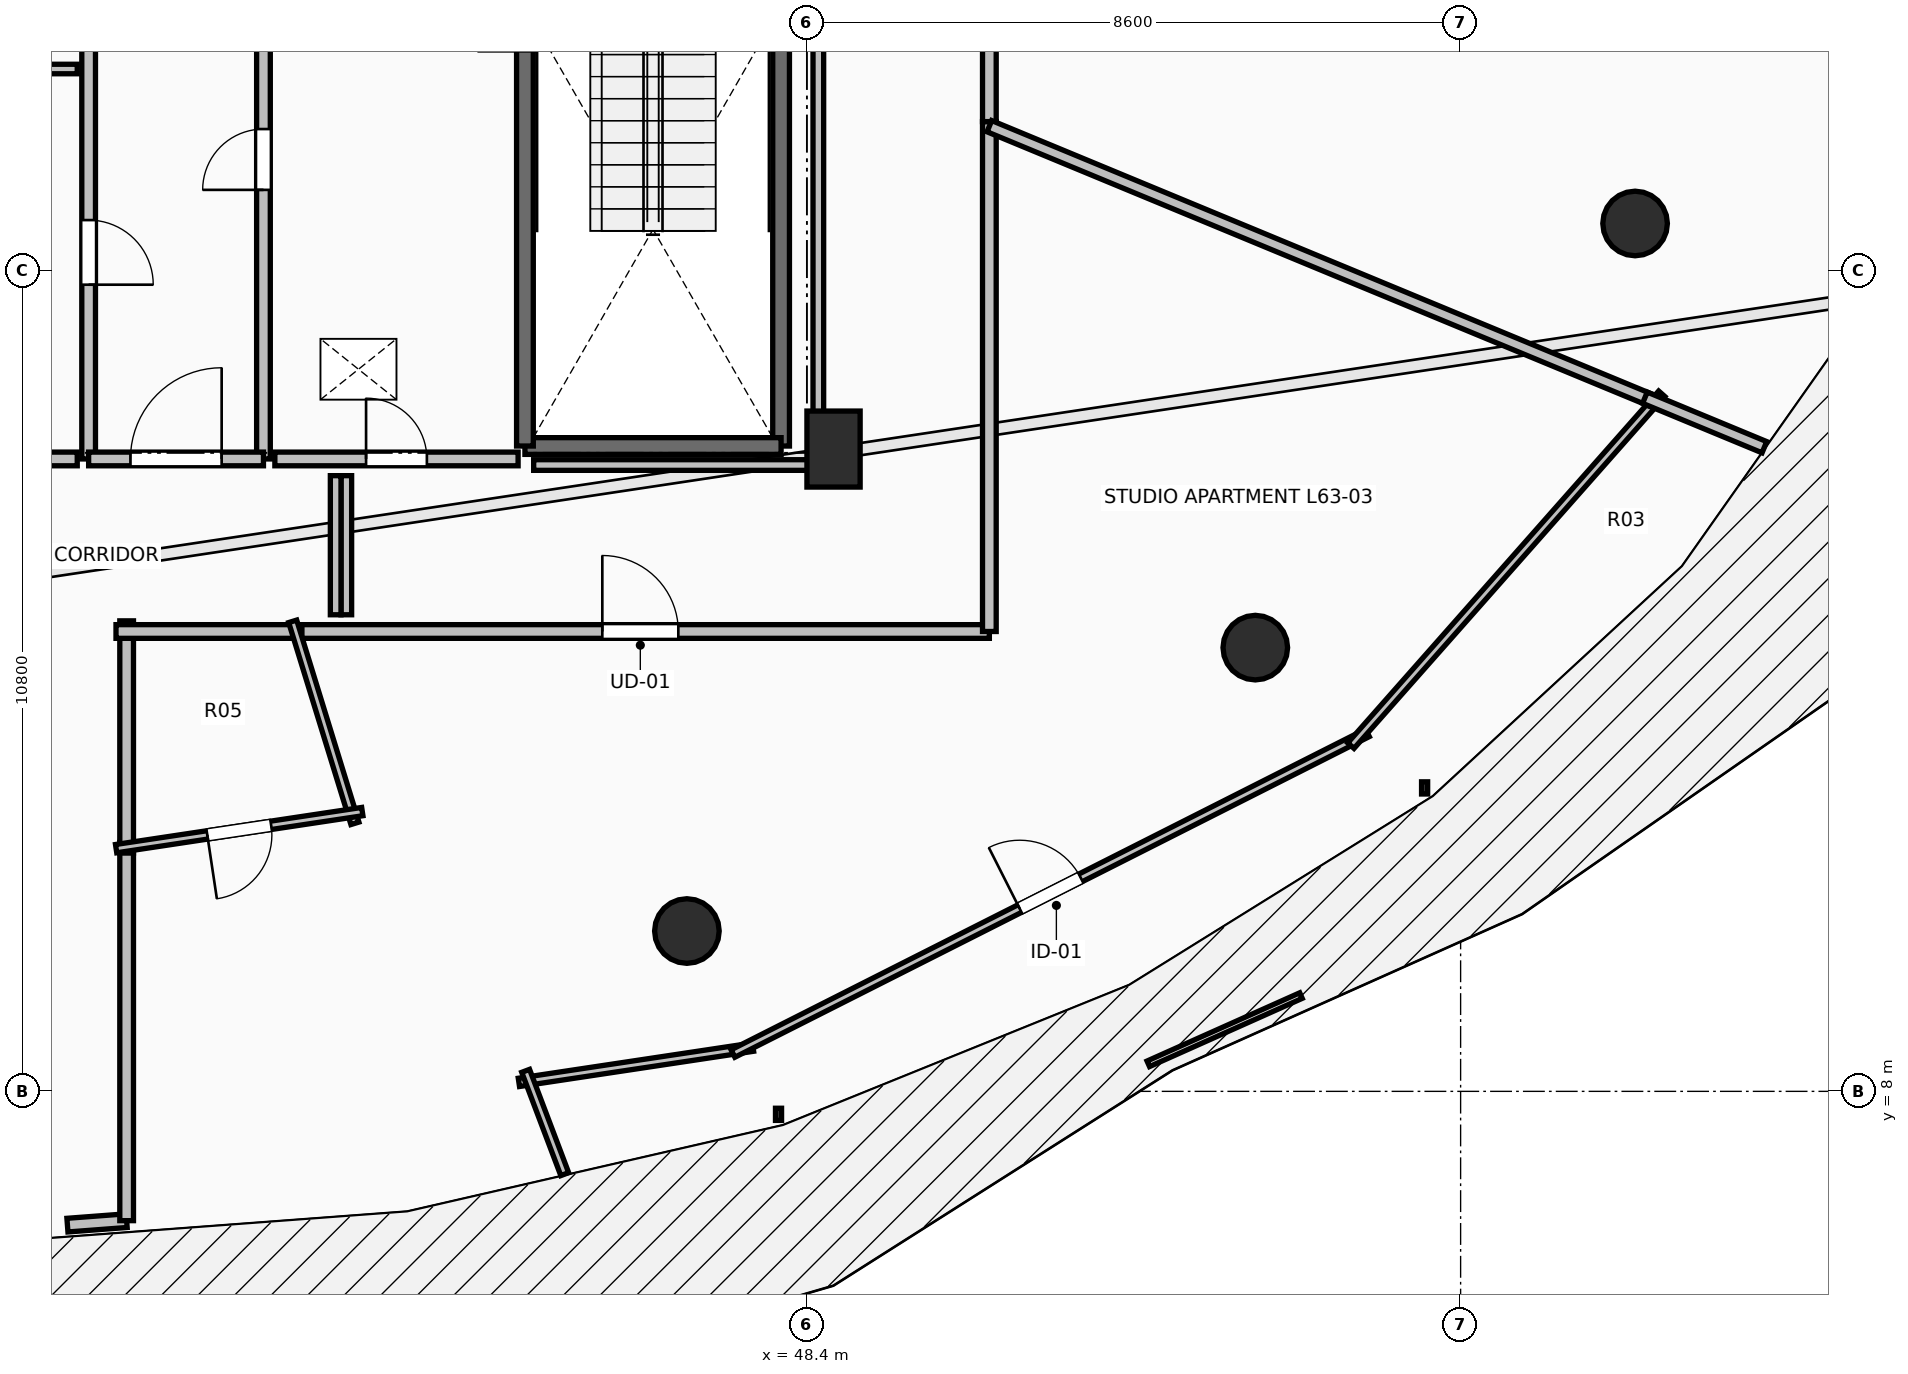
"""IFC4 building model, lengths in metres.
Left out: names, types, materials, properties, quantities, classifications, styles, units other than length and angle.
Written with IfcOpenShell. Run it as: python <this file> out.ifc"""

import sys

from ifc_helpers import new_model, si_unit, direction, frame, frame_2d, origin, origin_2d, place, context, subcontext, project, spatial, rectangle, circle, extrude, element, fill, save


model = new_model("IFC4")
c1 = context("Model", 3, precision=1e-05, world=origin(), true_north=direction((0.0, 1.0)))
c2 = subcontext(c1, "Body", "Model", "MODEL_VIEW")
j1 = project(units=[si_unit("LENGTHUNIT", "METRE"), si_unit("PLANEANGLEUNIT", "RADIAN")], contexts=[c1])
p1 = place(None, origin())
s1 = spatial("IfcSite", under=j1, at=p1, CompositionType="ELEMENT")
p2 = place(p1, origin())
s2 = spatial("IfcBuilding", under=s1, at=p2, CompositionType="ELEMENT")
p3 = place(p2, frame((0.0, 0.0, 234.25)))
s3 = spatial("IfcBuildingStorey", under=s2, at=p3, CompositionType="ELEMENT", Elevation=234.25)
for number, where, z_axis, x_axis in (
    (1, (46.821, 10.109, 0.0), (0.0, 0.0, 1.0), (0.383, -0.924, 0.0)),
    (2, (54.299, 13.838, 0.0), (0.0, 0.0, 1.0), (0.707, -0.707, 0.0)),
    (3, (59.295, 19.418, 0.0), (0.0, 0.0, 1.0), (0.924, -0.383, 0.0)),
):
    element("IfcColumn", number, at=place(p3, frame(where, z_axis=z_axis, x_axis=x_axis)), inside=s3, PredefinedType="COLUMN", context=c2, shape_type="SweptSolid", body=[
        extrude(circle(Radius=0.425, at=origin_2d()), origin(), (0.0, 0.0, 1.0), 3.55),
    ])
p4 = place(p3, frame((48.75, 16.45, 0.0), z_axis=(0.0, 0.0, 1.0), x_axis=(1.0, 0.0, 0.0)))
e4 = element("IfcColumn", 4, at=p4, inside=s3, PredefinedType="PILASTER", context=c2, shape_type="SweptSolid", body=[
    extrude(rectangle(XDim=0.7, YDim=1.0, at=origin_2d()), origin(), (0.0, 0.0, 1.0), 3.55),
])
p5 = place(p3, frame((48.06, 23.91, 0.0), z_axis=(0.0, 0.0, 1.0), x_axis=(0.0, -1.0, 0.0)))
e5 = element("IfcWall", 5, at=p5, inside=s3, PredefinedType="SOLIDWALL", context=c2, shape_type="SweptSolid", body=[
    extrude(rectangle(XDim=7.42, YDim=0.22, at=frame_2d((3.71, 0.0))), origin(), (0.0, 0.0, 1.0), 3.29),
])
p6 = place(p3, frame((48.06, 16.49, 0.0), z_axis=(0.0, 0.0, 1.0), x_axis=(-1.0, 0.0, 0.0)))
e6 = element("IfcWall", 6, at=p6, inside=s3, PredefinedType="SOLIDWALL", context=c2, shape_type="SweptSolid", body=[
    extrude(rectangle(XDim=3.37, YDim=0.22, at=frame_2d((1.685, 0.0))), origin(), (0.0, 0.0, 1.0), 3.29),
])
p7 = place(p3, frame((44.69, 16.49, 0.0), z_axis=(0.0, 0.0, 1.0), x_axis=(0.0, 1.0, 0.0)))
e7 = element("IfcWall", 7, at=p7, inside=s3, PredefinedType="SOLIDWALL", context=c2, shape_type="SweptSolid", body=[
    extrude(rectangle(XDim=7.42, YDim=0.22, at=frame_2d((3.71, 0.0))), origin(), (0.0, 0.0, 1.0), 3.29),
])
p8 = place(p3, frame((41.25, 16.32, 0.0), z_axis=(0.0, 0.0, 1.0), x_axis=(0.0, 1.0, 0.0)))
e8 = element("IfcWall", 8, at=p8, inside=s3, PredefinedType="PARTITIONING", context=c2, shape_type="SweptSolid", body=[
    extrude(rectangle(XDim=7.88, YDim=0.18, at=frame_2d((3.94, 0.0))), origin(), (0.0, 0.0, 1.0), 2.482),
])
p9 = place(p8, frame((3.54, 0.0, 0.0)))
e9 = element("IfcOpeningElement", 9, at=p9, cuts=e8, PredefinedType="OPENING", context=c2, shape_type="SweptSolid", body=[
    extrude(rectangle(XDim=0.8, YDim=2.05, at=frame_2d((0.4, 1.025))), frame((0.0, 0.105, 0.0), z_axis=(0.0, -1.0, 0.0), x_axis=(1.0, 0.0, 0.0)), (0.0, 0.0, 1.0), 0.21),
])
p10 = place(p3, frame((38.95, 21.755, 0.0), z_axis=(0.0, 0.0, 1.0), x_axis=(0.0, -1.0, 0.0)))
e10 = element("IfcWall", 10, at=p10, inside=s3, PredefinedType="PARTITIONING", context=c2, shape_type="SweptSolid", body=[
    extrude(rectangle(XDim=5.435, YDim=0.18, at=frame_2d((2.717, 0.0))), origin(), (0.0, 0.0, 1.0), 3.29),
])
p11 = place(p10, frame((2.292, 0.0, 0.0)))
e11 = element("IfcOpeningElement", 11, at=p11, cuts=e10, PredefinedType="OPENING", context=c2, shape_type="SweptSolid", body=[
    extrude(rectangle(XDim=0.85, YDim=2.1, at=frame_2d((0.425, 1.05))), frame((0.0, 0.105, 0.0), z_axis=(0.0, -1.0, 0.0), x_axis=(1.0, 0.0, 0.0)), (0.0, 0.0, 1.0), 0.21),
])
p12 = place(p3, frame((38.95, 16.32, 0.0), z_axis=(0.0, 0.0, 1.0), x_axis=(1.0, 0.0, 0.0)))
e12 = element("IfcWall", 12, at=p12, inside=s3, PredefinedType="PARTITIONING", context=c2, shape_type="SweptSolid", body=[
    extrude(rectangle(XDim=2.3, YDim=0.18, at=frame_2d((1.15, 0.0))), origin(), (0.0, 0.0, 1.0), 3.29),
])
p13 = place(p12, frame((0.55, 0.0, 0.0)))
e13 = element("IfcOpeningElement", 13, at=p13, cuts=e12, PredefinedType="OPENING", context=c2, shape_type="SweptSolid", body=[
    extrude(rectangle(XDim=1.2, YDim=2.15, at=frame_2d((0.6, 1.075))), frame((0.0, 0.105, 0.0), z_axis=(0.0, -1.0, 0.0), x_axis=(1.0, 0.0, 0.0)), (0.0, 0.0, 1.0), 0.21),
])
p14 = place(p3, frame((41.4, 16.32, 0.0), z_axis=(0.0, 0.0, 1.0), x_axis=(1.0, 0.0, 0.0)))
e14 = element("IfcWall", 14, at=p14, inside=s3, PredefinedType="PARTITIONING", context=c2, shape_type="SweptSolid", body=[
    extrude(rectangle(XDim=3.2, YDim=0.18, at=frame_2d((1.6, 0.0))), origin(), (0.0, 0.0, 1.0), 3.29),
])
p15 = place(p14, frame((1.2, 0.0, 0.0)))
e15 = element("IfcOpeningElement", 15, at=p15, cuts=e14, PredefinedType="OPENING", context=c2, shape_type="SweptSolid", body=[
    extrude(rectangle(XDim=0.8, YDim=2.05, at=frame_2d((0.4, 1.025))), frame((0.0, 0.105, 0.0), z_axis=(0.0, -1.0, 0.0), x_axis=(1.0, 0.0, 0.0)), (0.0, 0.0, 1.0), 0.21),
])
p16 = place(p3, frame((38.8, 21.45, 0.0), z_axis=(0.0, 0.0, 1.0), x_axis=(-1.0, 0.0, 0.0)))
e16 = element("IfcWall", 16, at=p16, inside=s3, PredefinedType="PARTITIONING", context=c2, shape_type="SweptSolid", body=[
    extrude(rectangle(XDim=3.6, YDim=0.125, at=frame_2d((1.8, 0.0))), origin(), (0.0, 0.0, 1.0), 3.29),
])
p17 = place(p3, frame((35.2, 16.32, 0.0), z_axis=(0.0, 0.0, 1.0), x_axis=(1.0, 0.0, 0.0)))
e17 = element("IfcWall", 17, at=p17, inside=s3, PredefinedType="PARTITIONING", context=c2, shape_type="SweptSolid", body=[
    extrude(rectangle(XDim=3.6, YDim=0.18, at=frame_2d((1.8, 0.0))), origin(), (0.0, 0.0, 1.0), 3.29),
])
p18 = place(p17, frame((1.375, 0.0, 0.0)))
e18 = element("IfcOpeningElement", 18, at=p18, cuts=e17, PredefinedType="OPENING", context=c2, shape_type="SweptSolid", body=[
    extrude(rectangle(XDim=0.85, YDim=2.1, at=frame_2d((0.425, 1.05))), frame((0.0, 0.105, 0.0), z_axis=(0.0, -1.0, 0.0), x_axis=(1.0, 0.0, 0.0)), (0.0, 0.0, 1.0), 0.21),
])
p19 = place(p3, frame((38.671, 6.24, 0.0), z_axis=(0.0, 0.0, 1.0), x_axis=(0.997136622012, 0.0756211415, 0.0)))
e19 = element("IfcWall", 19, at=p19, inside=s3, PredefinedType="PARTITIONING", context=c2, shape_type="SweptSolid", body=[
    extrude(rectangle(XDim=0.781, YDim=0.18, at=frame_2d((0.391, 0.0))), origin(), (0.0, 0.0, 1.0), 3.29),
])
p20 = place(p3, frame((39.45, 6.299, 0.0), z_axis=(0.0, 0.0, 1.0), x_axis=(0.0, 1.0, 0.0)))
e20 = element("IfcWall", 20, at=p20, inside=s3, PredefinedType="PARTITIONING", context=c2, shape_type="SweptSolid", body=[
    extrude(rectangle(XDim=4.976, YDim=0.18, at=frame_2d((2.488, 0.0))), origin(), (0.0, 0.0, 1.0), 2.482),
])
p21 = place(p3, frame((41.616, 14.05, 0.0), z_axis=(0.0, 0.0, 1.0), x_axis=(1.0, 0.0, 0.0)))
e21 = element("IfcWall", 21, at=p21, inside=s3, PredefinedType="PARTITIONING", context=c2, shape_type="SweptSolid", body=[
    extrude(rectangle(XDim=9.184, YDim=0.18, at=frame_2d((4.592, 0.0))), origin(), (0.0, 0.0, 1.0), 2.482),
])
p22 = place(p21, frame((4.092, 0.0, 0.0)))
e22 = element("IfcOpeningElement", 22, at=p22, cuts=e21, PredefinedType="OPENING", context=c2, shape_type="SweptSolid", body=[
    extrude(rectangle(XDim=1.0, YDim=2.15, at=frame_2d((0.5, 1.075))), frame((0.0, 0.105, 0.0), z_axis=(0.0, -1.0, 0.0), x_axis=(1.0, 0.0, 0.0)), (0.0, 0.0, 1.0), 0.21),
])
p23 = place(p3, frame((50.8, 14.05, 0.0), z_axis=(0.0, 0.0, 1.0), x_axis=(0.0, 1.0, 0.0)))
e23 = element("IfcWall", 23, at=p23, inside=s3, PredefinedType="PARTITIONING", context=c2, shape_type="SweptSolid", body=[
    extrude(rectangle(XDim=6.708, YDim=0.18, at=frame_2d((3.354, 0.0))), origin(), (0.0, 0.0, 1.0), 2.482),
])
p24 = place(p3, frame((39.45, 11.135, 0.0), z_axis=(0.0, 0.0, 1.0), x_axis=(0.0, 1.0, 0.0)))
e24 = element("IfcWall", 24, at=p24, inside=s3, PredefinedType="PARTITIONING", context=c2, shape_type="SweptSolid", body=[
    extrude(rectangle(XDim=3.055, YDim=0.18, at=frame_2d((1.527, 0.0))), origin(), (0.0, 0.0, 1.0), 2.924),
])
p25 = place(p3, frame((39.31, 14.05, 0.0), z_axis=(0.0, 0.0, 1.0), x_axis=(1.0, 0.0, 0.0)))
e25 = element("IfcWall", 25, at=p25, inside=s3, PredefinedType="PARTITIONING", context=c2, shape_type="SweptSolid", body=[
    extrude(rectangle(XDim=2.446, YDim=0.18, at=frame_2d((1.223, 0.0))), origin(), (0.0, 0.0, 1.0), 2.972),
])
p26 = place(p3, frame((50.8, 20.758, 0.0), z_axis=(0.0, 0.0, 1.0), x_axis=(0.0, 1.0, 0.0)))
e26 = element("IfcWall", 26, at=p26, inside=s3, PredefinedType="PARTITIONING", context=c2, shape_type="SweptSolid", body=[
    extrude(rectangle(XDim=15.192, YDim=0.18, at=frame_2d((7.596, 0.0))), origin(), (0.0, 0.0, 1.0), 2.482),
])
p27 = place(p26, frame((7.096, 0.0, 0.0)))
e27 = element("IfcOpeningElement", 27, at=p27, cuts=e26, PredefinedType="OPENING", context=c2, shape_type="SweptSolid", body=[
    extrude(rectangle(XDim=1.0, YDim=2.15, at=frame_2d((0.5, 1.075))), frame((0.0, 0.105, 0.0), z_axis=(0.0, -1.0, 0.0), x_axis=(1.0, 0.0, 0.0)), (0.0, 0.0, 1.0), 0.21),
])
p28 = place(p3, frame((41.635, 14.184, 0.0), z_axis=(0.0, 0.0, 1.0), x_axis=(0.294283258928, -0.955718244837, 0.0)))
e28 = element("IfcWall", 28, at=p28, inside=s3, PredefinedType="PARTITIONING", context=c2, shape_type="SweptSolid", body=[
    extrude(rectangle(XDim=2.781, YDim=0.11, at=frame_2d((1.39, 0.0))), origin(), (0.0, 0.0, 1.0), 2.482),
])
p29 = place(p3, frame((42.55, 11.681, 0.0), z_axis=(0.0, 0.0, 1.0), x_axis=(-0.98884760338, -0.148930914485, 0.0)))
e29 = element("IfcWall", 29, at=p29, inside=s3, PredefinedType="PARTITIONING", context=c2, shape_type="SweptSolid", body=[
    extrude(rectangle(XDim=3.275, YDim=0.11, at=frame_2d((1.638, 0.0))), origin(), (0.0, 0.0, 1.0), 2.482),
])
p30 = place(p29, frame((1.213, 0.0, 0.0)))
e30 = element("IfcOpeningElement", 30, at=p30, cuts=e29, PredefinedType="OPENING", context=c2, shape_type="SweptSolid", body=[
    extrude(rectangle(XDim=0.85, YDim=2.1, at=frame_2d((0.425, 1.05))), frame((0.0, 0.07, 0.0), z_axis=(0.0, -1.0, 0.0), x_axis=(1.0, 0.0, 0.0)), (0.0, 0.0, 1.0), 0.14),
])
p31 = place(p3, frame((44.611, 8.118, 0.0), z_axis=(0.0, 0.0, 1.0), x_axis=(0.988858596585, 0.148857905265, 0.0)))
e31 = element("IfcWall", 31, at=p31, inside=s3, PredefinedType="PARTITIONING", context=c2, shape_type="SweptSolid", body=[
    extrude(rectangle(XDim=3.115, YDim=0.11, at=frame_2d((1.557, 0.0))), origin(), (0.0, 0.0, 1.0), 3.29),
])
p32 = place(p3, frame((47.427, 8.498, 0.0), z_axis=(0.0, 0.0, 1.0), x_axis=(0.892502876412, 0.451041700507, 0.0)))
e32 = element("IfcWall", 32, at=p32, inside=s3, PredefinedType="PARTITIONING", context=c2, shape_type="SweptSolid", body=[
    extrude(rectangle(XDim=9.352, YDim=0.11, at=frame_2d((4.676, 0.0))), origin(), (0.0, 0.0, 1.0), 3.29),
])
p33 = place(p32, frame((4.226, 0.0, 0.0)))
e33 = element("IfcOpeningElement", 33, at=p33, cuts=e32, PredefinedType="OPENING", context=c2, shape_type="SweptSolid", body=[
    extrude(rectangle(XDim=0.9, YDim=2.1, at=frame_2d((0.45, 1.05))), frame((0.0, 0.07, 0.0), z_axis=(0.0, -1.0, 0.0), x_axis=(1.0, 0.0, 0.0)), (0.0, 0.0, 1.0), 0.14),
])
p34 = place(p3, frame((55.556, 12.548, 0.0), z_axis=(0.0, 0.0, 1.0), x_axis=(0.662167862663, 0.749355537549, 0.0)))
e34 = element("IfcWall", 34, at=p34, inside=s3, PredefinedType="PARTITIONING", context=c2, shape_type="SweptSolid", body=[
    extrude(rectangle(XDim=6.177, YDim=0.11, at=frame_2d((3.089, 0.0))), origin(), (0.0, 0.0, 1.0), 3.29),
])
p35 = place(p3, frame((45.213, 6.911, 0.0), z_axis=(0.0, 0.0, 1.0), x_axis=(-0.353737146492, 0.935344872863, 0.0)))
e35 = element("IfcWall", 35, at=p35, inside=s3, PredefinedType="PARTITIONING", context=c2, shape_type="SweptSolid", body=[
    extrude(rectangle(XDim=1.453, YDim=0.11, at=frame_2d((0.727, 0.0))), origin(), (0.0, 0.0, 1.0), 3.29),
])
p36 = place(p3, frame((59.554, 17.072, 0.0), z_axis=(0.0, 0.0, 1.0), x_axis=(-0.923879910499, 0.382682519822, 0.0)))
e36 = element("IfcWall", 36, at=p36, inside=s3, PredefinedType="PARTITIONING", context=c2, shape_type="SweptSolid", body=[
    extrude(rectangle(XDim=9.475, YDim=0.16, at=frame_2d((4.738, 0.0))), origin(), (0.0, 0.0, 1.0), 2.874),
])
p37 = place(p3, frame((60.996, 16.474, 0.0), z_axis=(0.0, 0.0, 1.0), x_axis=(-0.923843638485, 0.382770076719, 0.0)))
e37 = element("IfcWall", 37, at=p37, inside=s3, PredefinedType="PARTITIONING", context=c2, shape_type="SweptSolid", body=[
    extrude(rectangle(XDim=1.701, YDim=0.16, at=frame_2d((0.851, 0.0))), origin(), (0.0, 0.0, 1.0), 3.29),
])
p38 = place(p3, frame((42.34, 14.27, 0.0), z_axis=(0.0, 0.0, 1.0), x_axis=(0.0, 1.0, 0.0)))
e38 = element("IfcWall", 38, at=p38, inside=s3, PredefinedType="PARTITIONING", context=c2, shape_type="SweptSolid", body=[
    extrude(rectangle(XDim=1.83, YDim=0.14, at=frame_2d((0.915, 0.0))), origin(), (0.0, 0.0, 1.0), 3.29),
])
p39 = place(p3, frame((44.805, 16.24, 0.0), z_axis=(0.0, 0.0, 1.0), x_axis=(1.0, 0.0, 0.0)))
e39 = element("IfcWall", 39, at=p39, inside=s3, PredefinedType="PARTITIONING", context=c2, shape_type="SweptSolid", body=[
    extrude(rectangle(XDim=3.745, YDim=0.14, at=frame_2d((1.873, 0.0))), origin(), (0.0, 0.0, 1.0), 2.482),
])
p40 = place(p3, frame((48.55, 16.24, 0.0), z_axis=(0.0, 0.0, 1.0), x_axis=(0.0, 1.0, 0.0)))
e40 = element("IfcWall", 40, at=p40, inside=s3, PredefinedType="PARTITIONING", context=c2, shape_type="SweptSolid", body=[
    extrude(rectangle(XDim=7.514, YDim=0.14, at=frame_2d((3.757, 0.0))), origin(), (0.0, 0.0, 1.0), 2.482),
])
p41 = place(p3, frame((42.2, 16.1, 0.0), z_axis=(0.0, 0.0, 1.0), x_axis=(0.0, -1.0, 0.0)))
e41 = element("IfcWall", 41, at=p41, inside=s3, PredefinedType="PARTITIONING", context=c2, shape_type="SweptSolid", body=[
    extrude(rectangle(XDim=1.83, YDim=0.14, at=frame_2d((0.915, 0.0))), origin(), (0.0, 0.0, 1.0), 3.29),
])
p42 = place(p9, origin())
e42 = element("IfcDoor", 42, at=p42, inside=s3, OperationType="SINGLE_SWING_LEFT", PredefinedType="DOOR", context=c2, shape_type="SweptSolid", body=[
    extrude(rectangle(XDim=0.8, YDim=2.05, at=frame_2d((0.4, 1.025))), frame((0.0, 0.025, 0.0), z_axis=(0.0, -1.0, 0.0), x_axis=(1.0, 0.0, 0.0)), (0.0, 0.0, 1.0), 0.05),
])
fill(e9, e42)
p43 = place(p11, origin())
e43 = element("IfcDoor", 43, at=p43, inside=s3, OperationType="SINGLE_SWING_RIGHT", PredefinedType="DOOR", context=c2, shape_type="SweptSolid", body=[
    extrude(rectangle(XDim=0.85, YDim=2.1, at=frame_2d((0.425, 1.05))), frame((0.0, 0.025, 0.0), z_axis=(0.0, -1.0, 0.0), x_axis=(1.0, 0.0, 0.0)), (0.0, 0.0, 1.0), 0.05),
])
fill(e11, e43)
p44 = place(p13, origin())
e44 = element("IfcDoor", 44, at=p44, inside=s3, OperationType="SINGLE_SWING_RIGHT", PredefinedType="DOOR", context=c2, shape_type="SweptSolid", body=[
    extrude(rectangle(XDim=1.2, YDim=2.15, at=frame_2d((0.6, 1.075))), frame((0.0, 0.025, 0.0), z_axis=(0.0, -1.0, 0.0), x_axis=(1.0, 0.0, 0.0)), (0.0, 0.0, 1.0), 0.05),
])
fill(e13, e44)
p45 = place(p15, origin())
e45 = element("IfcDoor", 45, at=p45, inside=s3, OperationType="SINGLE_SWING_LEFT", PredefinedType="DOOR", context=c2, shape_type="SweptSolid", body=[
    extrude(rectangle(XDim=0.8, YDim=2.05, at=frame_2d((0.4, 1.025))), frame((0.0, 0.025, 0.0), z_axis=(0.0, -1.0, 0.0), x_axis=(1.0, 0.0, 0.0)), (0.0, 0.0, 1.0), 0.05),
])
fill(e15, e45)
p46 = place(p22, origin())
e46 = element("IfcDoor", 46, at=p46, inside=s3, OperationType="SINGLE_SWING_LEFT", PredefinedType="DOOR", context=c2, shape_type="SweptSolid", body=[
    extrude(rectangle(XDim=1.0, YDim=2.15, at=frame_2d((0.5, 1.075))), frame((0.0, 0.025, 0.0), z_axis=(0.0, -1.0, 0.0), x_axis=(1.0, 0.0, 0.0)), (0.0, 0.0, 1.0), 0.05),
])
fill(e22, e46)
p47 = place(p30, origin())
e47 = element("IfcDoor", 47, at=p47, inside=s3, OperationType="SINGLE_SWING_RIGHT", PredefinedType="DOOR", context=c2, shape_type="SweptSolid", body=[
    extrude(rectangle(XDim=0.85, YDim=2.1, at=frame_2d((0.425, 1.05))), frame((0.0, 0.025, 0.0), z_axis=(0.0, -1.0, 0.0), x_axis=(1.0, 0.0, 0.0)), (0.0, 0.0, 1.0), 0.05),
])
fill(e30, e47)
p48 = place(p33, origin())
e48 = element("IfcDoor", 48, at=p48, inside=s3, OperationType="SINGLE_SWING_LEFT", PredefinedType="DOOR", context=c2, shape_type="SweptSolid", body=[
    extrude(rectangle(XDim=0.9, YDim=2.1, at=frame_2d((0.45, 1.05))), frame((0.0, 0.025, 0.0), z_axis=(0.0, -1.0, 0.0), x_axis=(1.0, 0.0, 0.0)), (0.0, 0.0, 1.0), 0.05),
])
fill(e33, e48)
save(model, sys.argv[1])
